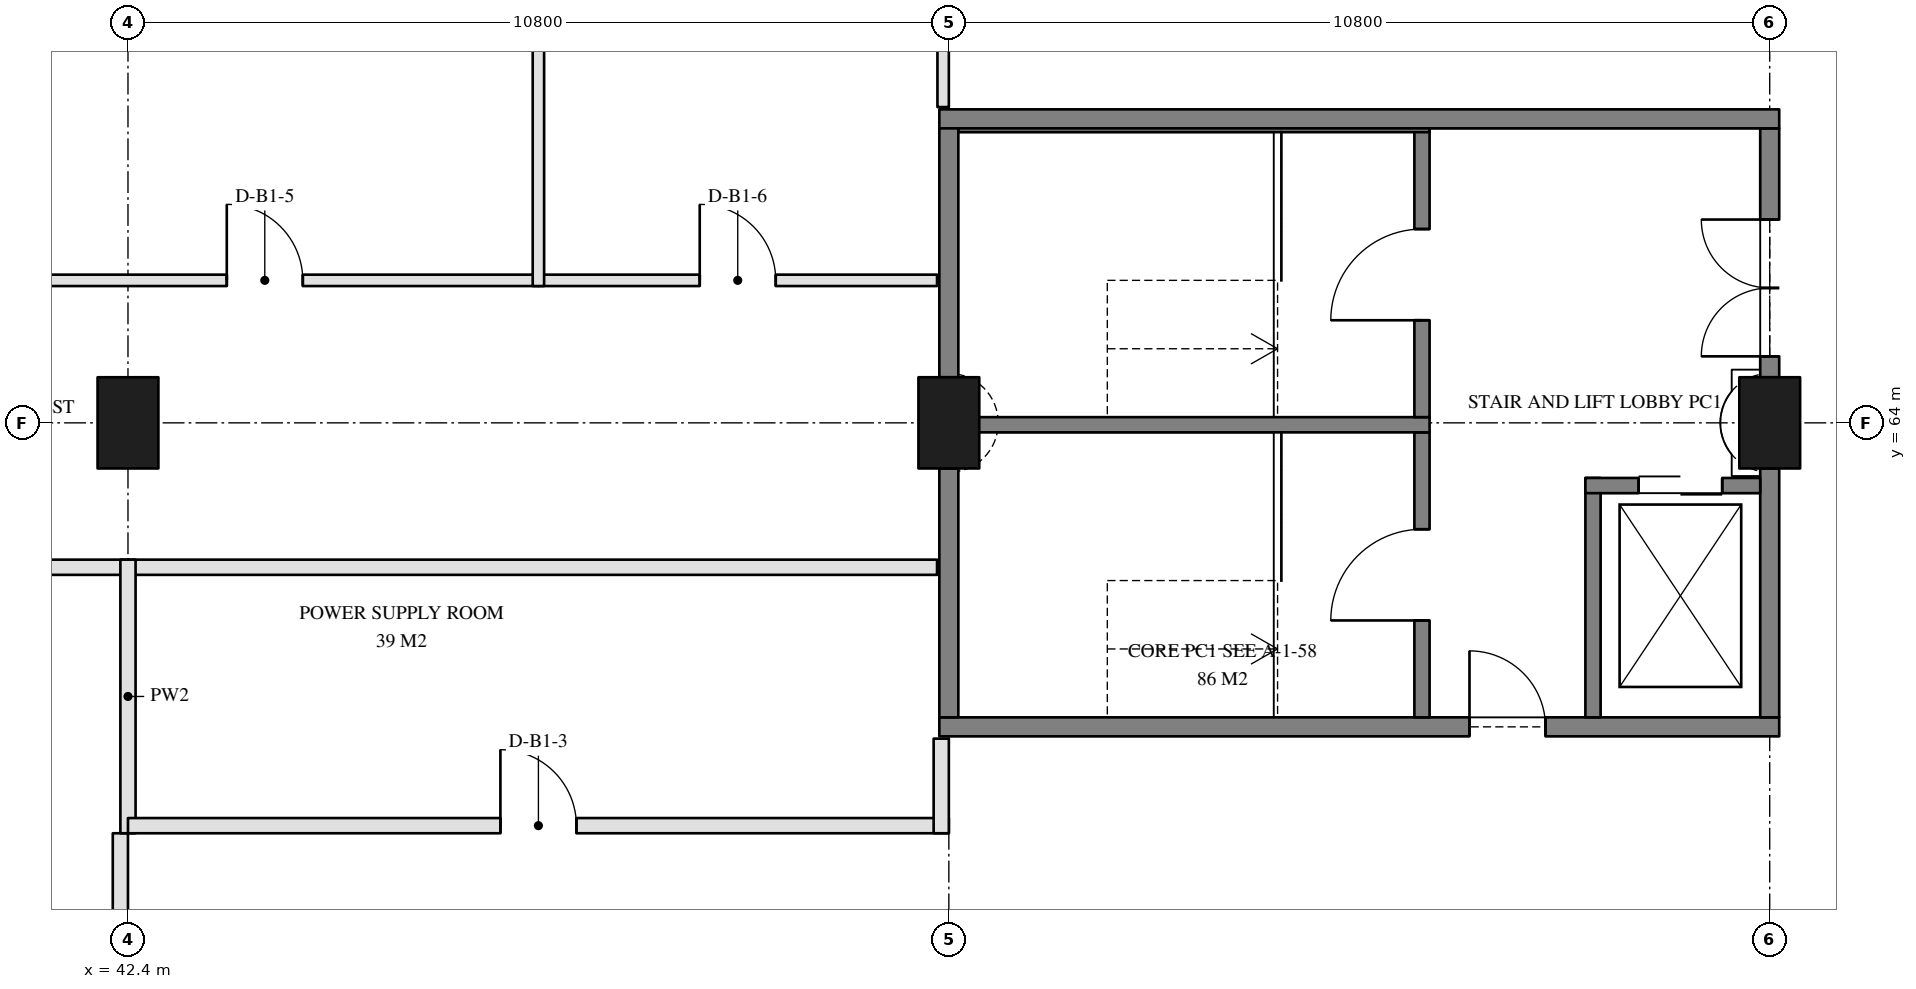
"""IFC4 building model, lengths in metres.
Left out: names, types, materials, properties, quantities, classifications, styles, units other than length and angle.
Written with IfcOpenShell. Run it as: python <this file> out.ifc"""

import sys

from ifc_helpers import new_model, si_unit, direction, frame, frame_2d, origin, origin_2d, place, context, subcontext, project, spatial, rectangle, extrude, element, fill, save


model = new_model("IFC4")
c1 = context("Model", 3, precision=1e-05, world=origin(), true_north=direction((0.0, 1.0)))
c2 = subcontext(c1, "Body", "Model", "MODEL_VIEW")
j1 = project(units=[si_unit("LENGTHUNIT", "METRE"), si_unit("PLANEANGLEUNIT", "RADIAN")], contexts=[c1])
p1 = place(None, origin())
s1 = spatial("IfcSite", under=j1, at=p1, CompositionType="ELEMENT")
p2 = place(p1, origin())
s2 = spatial("IfcBuilding", under=s1, at=p2, CompositionType="ELEMENT")
p3 = place(p2, frame((0.0, 0.0, -5.4)))
s3 = spatial("IfcBuildingStorey", under=s2, at=p3, CompositionType="ELEMENT", Elevation=-5.4)
for number, where, z_axis, x_axis in (
    (1, (42.4, 64.0, 0.0), (0.0, 0.0, 1.0), (1.0, 0.0, 0.0)),
    (2, (53.2, 64.0, 0.0), (0.0, 0.0, 1.0), (1.0, 0.0, 0.0)),
    (3, (64.0, 64.0, 0.0), (0.0, 0.0, 1.0), (1.0, 0.0, 0.0)),
):
    element("IfcColumn", number, at=place(p3, frame(where, z_axis=z_axis, x_axis=x_axis)), inside=s3, PredefinedType="COLUMN", context=c2, shape_type="SweptSolid", body=[
        extrude(rectangle(XDim=0.8, YDim=1.2, at=origin_2d()), origin(), (0.0, 0.0, 1.0), 5.4),
    ])
p4 = place(p3, frame((53.075, 60.0, 0.0), z_axis=(0.0, 0.0, 1.0), x_axis=(1.0, 0.0, 0.0)))
e4 = element("IfcWall", 4, at=p4, inside=s3, PredefinedType="SOLIDWALL", context=c2, shape_type="SweptSolid", body=[
    extrude(rectangle(XDim=11.05, YDim=0.25, at=frame_2d((5.525, 0.0))), origin(), (0.0, 0.0, 1.0), 4.8),
])
p5 = place(p4, frame((6.975, 0.0, 0.0)))
e5 = element("IfcOpeningElement", 5, at=p5, cuts=e4, PredefinedType="OPENING", context=c2, shape_type="SweptSolid", body=[
    extrude(rectangle(XDim=1.0, YDim=2.1, at=frame_2d((0.5, 1.05))), frame((0.0, 0.135, 0.0), z_axis=(0.0, -1.0, 0.0), x_axis=(1.0, 0.0, 0.0)), (0.0, 0.0, 1.0), 0.27),
])
p6 = place(p3, frame((64.0, 60.125, 0.0), z_axis=(0.0, 0.0, 1.0), x_axis=(0.0, 1.0, 0.0)))
e6 = element("IfcWall", 6, at=p6, inside=s3, PredefinedType="SOLIDWALL", context=c2, shape_type="SweptSolid", body=[
    extrude(rectangle(XDim=3.275, YDim=0.25, at=frame_2d((1.637, 0.0))), origin(), (0.0, 0.0, 1.0), 4.8),
])
p7 = place(p3, frame((64.0, 64.6, 0.0), z_axis=(0.0, 0.0, 1.0), x_axis=(0.0, 1.0, 0.0)))
e7 = element("IfcWall", 7, at=p7, inside=s3, PredefinedType="SOLIDWALL", context=c2, shape_type="SweptSolid", body=[
    extrude(rectangle(XDim=3.275, YDim=0.25, at=frame_2d((1.637, 0.0))), origin(), (0.0, 0.0, 1.0), 4.8),
])
p8 = place(p7, frame((0.275, 0.0, 0.0)))
e8 = element("IfcOpeningElement", 8, at=p8, cuts=e7, PredefinedType="OPENING", context=c2, shape_type="SweptSolid", body=[
    extrude(rectangle(XDim=1.8, YDim=2.1, at=frame_2d((0.9, 1.05))), frame((0.0, 0.135, 0.0), z_axis=(0.0, -1.0, 0.0), x_axis=(1.0, 0.0, 0.0)), (0.0, 0.0, 1.0), 0.27),
])
p9 = place(p3, frame((64.125, 68.0, 0.0), z_axis=(0.0, 0.0, 1.0), x_axis=(-1.0, 0.0, 0.0)))
e9 = element("IfcWall", 9, at=p9, inside=s3, PredefinedType="SOLIDWALL", context=c2, shape_type="SweptSolid", body=[
    extrude(rectangle(XDim=11.05, YDim=0.25, at=frame_2d((5.525, 0.0))), origin(), (0.0, 0.0, 1.0), 4.8),
])
for number, where, z_axis, x_axis in (
    (10, (53.2, 67.875, 0.0), (0.0, 0.0, 1.0), (0.0, -1.0, 0.0)),
    (11, (53.2, 63.4, 0.0), (0.0, 0.0, 1.0), (0.0, -1.0, 0.0)),
):
    element("IfcWall", number, at=place(p3, frame(where, z_axis=z_axis, x_axis=x_axis)), inside=s3, PredefinedType="SOLIDWALL", context=c2, shape_type="SweptSolid", body=[
        extrude(rectangle(XDim=3.275, YDim=0.25, at=frame_2d((1.637, 0.0))), origin(), (0.0, 0.0, 1.0), 4.8),
    ])
p10 = place(p3, frame((59.425, 60.125, 0.0), z_axis=(0.0, 0.0, 1.0), x_axis=(0.0, 1.0, 0.0)))
e12 = element("IfcWall", 12, at=p10, inside=s3, PredefinedType="SOLIDWALL", context=c2, shape_type="SweptSolid", body=[
    extrude(rectangle(XDim=3.75, YDim=0.2, at=frame_2d((1.875, 0.0))), origin(), (0.0, 0.0, 1.0), 3.6),
])
p11 = place(p10, frame((1.275, 0.0, 0.0)))
e13 = element("IfcOpeningElement", 13, at=p11, cuts=e12, PredefinedType="OPENING", context=c2, shape_type="SweptSolid", body=[
    extrude(rectangle(XDim=1.2, YDim=2.1, at=frame_2d((0.6, 1.05))), frame((0.0, 0.11, 0.0), z_axis=(0.0, -1.0, 0.0), x_axis=(1.0, 0.0, 0.0)), (0.0, 0.0, 1.0), 0.22),
])
p12 = place(p3, frame((59.525, 63.975, 0.0), z_axis=(0.0, 0.0, 1.0), x_axis=(-1.0, 0.0, 0.0)))
e14 = element("IfcWall", 14, at=p12, inside=s3, PredefinedType="SOLIDWALL", context=c2, shape_type="SweptSolid", body=[
    extrude(rectangle(XDim=6.2, YDim=0.2, at=frame_2d((3.1, 0.0))), origin(), (0.0, 0.0, 1.0), 3.6),
])
p13 = place(p3, frame((59.425, 64.075, 0.0), z_axis=(0.0, 0.0, 1.0), x_axis=(0.0, 1.0, 0.0)))
e15 = element("IfcWall", 15, at=p13, inside=s3, PredefinedType="SOLIDWALL", context=c2, shape_type="SweptSolid", body=[
    extrude(rectangle(XDim=3.8, YDim=0.2, at=frame_2d((1.9, 0.0))), origin(), (0.0, 0.0, 1.0), 3.6),
])
p14 = place(p13, frame((1.275, 0.0, 0.0)))
e16 = element("IfcOpeningElement", 16, at=p14, cuts=e15, PredefinedType="OPENING", context=c2, shape_type="SweptSolid", body=[
    extrude(rectangle(XDim=1.2, YDim=2.1, at=frame_2d((0.6, 1.05))), frame((0.0, 0.11, 0.0), z_axis=(0.0, -1.0, 0.0), x_axis=(1.0, 0.0, 0.0)), (0.0, 0.0, 1.0), 0.22),
])
p15 = place(p3, frame((61.675, 60.125, 0.0), z_axis=(0.0, 0.0, 1.0), x_axis=(0.0, 1.0, 0.0)))
e17 = element("IfcWall", 17, at=p15, inside=s3, PredefinedType="SOLIDWALL", context=c2, shape_type="SweptSolid", body=[
    extrude(rectangle(XDim=3.15, YDim=0.2, at=frame_2d((1.575, 0.0))), origin(), (0.0, 0.0, 1.0), 4.8),
])
p16 = place(p3, frame((63.875, 63.175, 0.0), z_axis=(0.0, 0.0, 1.0), x_axis=(-1.0, 0.0, 0.0)))
e18 = element("IfcWall", 18, at=p16, inside=s3, PredefinedType="SOLIDWALL", context=c2, shape_type="SweptSolid", body=[
    extrude(rectangle(XDim=2.3, YDim=0.2, at=frame_2d((1.15, 0.0))), origin(), (0.0, 0.0, 1.0), 3.6),
])
p17 = place(p16, frame((0.5, 0.0, 0.0)))
e19 = element("IfcOpeningElement", 19, at=p17, cuts=e18, PredefinedType="OPENING", context=c2, shape_type="SweptSolid", body=[
    extrude(rectangle(XDim=1.1, YDim=2.1, at=frame_2d((0.55, 1.05))), frame((0.0, 0.11, 0.0), z_axis=(0.0, -1.0, 0.0), x_axis=(1.0, 0.0, 0.0)), (0.0, 0.0, 1.0), 0.22),
])
p18 = place(p3, frame((59.525, 67.85, 0.0), z_axis=(0.0, 0.0, 1.0), x_axis=(-1.0, 0.0, 0.0)))
e20 = element("IfcWall", 20, at=p18, inside=s3, PredefinedType="SOLIDWALL", context=c2, shape_type="SweptSolid", body=[
    extrude(rectangle(XDim=6.2, YDim=0.05, at=frame_2d((3.1, 0.0))), origin(), (0.0, 0.0, 1.0), 3.6),
])
p19 = place(p3, frame((37.0, 62.1, 0.0), z_axis=(0.0, 0.0, 1.0), x_axis=(1.0, 0.0, 0.0)))
e21 = element("IfcWall", 21, at=p19, inside=s3, PredefinedType="PARTITIONING", context=c2, shape_type="SweptSolid", body=[
    extrude(rectangle(XDim=5.4, YDim=0.2, at=frame_2d((2.7, 0.0))), origin(), (0.0, 0.0, 1.0), 3.6),
])
p20 = place(p19, frame((2.2, 0.0, 0.0)))
e22 = element("IfcOpeningElement", 22, at=p20, cuts=e21, PredefinedType="OPENING", context=c2, shape_type="SweptSolid", body=[
    extrude(rectangle(XDim=1.0, YDim=2.1, at=frame_2d((0.5, 1.05))), frame((0.0, 0.11, 0.0), z_axis=(0.0, -1.0, 0.0), x_axis=(1.0, 0.0, 0.0)), (0.0, 0.0, 1.0), 0.22),
])
p21 = place(p3, frame((42.4, 62.1, 0.0), z_axis=(0.0, 0.0, 1.0), x_axis=(1.0, 0.0, 0.0)))
e23 = element("IfcWall", 23, at=p21, inside=s3, PredefinedType="PARTITIONING", context=c2, shape_type="SweptSolid", body=[
    extrude(rectangle(XDim=10.645, YDim=0.2, at=frame_2d((5.323, 0.0))), origin(), (0.0, 0.0, 1.0), 3.6),
])
p22 = place(p3, frame((40.6, 65.875, 0.0), z_axis=(0.0, 0.0, 1.0), x_axis=(1.0, 0.0, 0.0)))
e24 = element("IfcWall", 24, at=p22, inside=s3, PredefinedType="PARTITIONING", context=c2, shape_type="SweptSolid", body=[
    extrude(rectangle(XDim=7.2, YDim=0.15, at=frame_2d((3.6, 0.0))), origin(), (0.0, 0.0, 1.0), 3.6),
])
p23 = place(p22, frame((3.1, 0.0, 0.0)))
e25 = element("IfcOpeningElement", 25, at=p23, cuts=e24, PredefinedType="OPENING", context=c2, shape_type="SweptSolid", body=[
    extrude(rectangle(XDim=1.0, YDim=2.1, at=frame_2d((0.5, 1.05))), frame((0.0, 0.085, 0.0), z_axis=(0.0, -1.0, 0.0), x_axis=(1.0, 0.0, 0.0)), (0.0, 0.0, 1.0), 0.17),
])
p24 = place(p3, frame((47.8, 65.875, 0.0), z_axis=(0.0, 0.0, 1.0), x_axis=(1.0, 0.0, 0.0)))
e26 = element("IfcWall", 26, at=p24, inside=s3, PredefinedType="PARTITIONING", context=c2, shape_type="SweptSolid", body=[
    extrude(rectangle(XDim=5.245, YDim=0.15, at=frame_2d((2.623, 0.0))), origin(), (0.0, 0.0, 1.0), 3.6),
])
p25 = place(p24, frame((2.123, 0.0, 0.0)))
e27 = element("IfcOpeningElement", 27, at=p25, cuts=e26, PredefinedType="OPENING", context=c2, shape_type="SweptSolid", body=[
    extrude(rectangle(XDim=1.0, YDim=2.1, at=frame_2d((0.5, 1.05))), frame((0.0, 0.085, 0.0), z_axis=(0.0, -1.0, 0.0), x_axis=(1.0, 0.0, 0.0)), (0.0, 0.0, 1.0), 0.17),
])
p26 = place(p3, frame((42.3, 53.72, 0.0), z_axis=(0.0, 0.0, 1.0), x_axis=(0.0, 1.0, 0.0)))
e28 = element("IfcWall", 28, at=p26, inside=s3, PredefinedType="PARTITIONING", context=c2, shape_type="SweptSolid", body=[
    extrude(rectangle(XDim=4.88, YDim=0.2, at=frame_2d((2.44, 0.0))), origin(), (0.0, 0.0, 1.0), 3.6),
])
p27 = place(p3, frame((42.4, 58.6, 0.0), z_axis=(0.0, 0.0, 1.0), x_axis=(0.0, 1.0, 0.0)))
e29 = element("IfcWall", 29, at=p27, inside=s3, PredefinedType="PARTITIONING", context=c2, shape_type="SweptSolid", body=[
    extrude(rectangle(XDim=3.6, YDim=0.2, at=frame_2d((1.8, 0.0))), origin(), (0.0, 0.0, 1.0), 3.6),
])
p28 = place(p3, frame((42.4, 58.7, 0.0), z_axis=(0.0, 0.0, 1.0), x_axis=(1.0, 0.0, 0.0)))
e30 = element("IfcWall", 30, at=p28, inside=s3, PredefinedType="PARTITIONING", context=c2, shape_type="SweptSolid", body=[
    extrude(rectangle(XDim=10.8, YDim=0.2, at=frame_2d((5.4, 0.0))), origin(), (0.0, 0.0, 1.0), 3.6),
])
p29 = place(p28, frame((4.9, 0.0, 0.0)))
e31 = element("IfcOpeningElement", 31, at=p29, cuts=e30, PredefinedType="OPENING", context=c2, shape_type="SweptSolid", body=[
    extrude(rectangle(XDim=1.0, YDim=2.1, at=frame_2d((0.5, 1.05))), frame((0.0, 0.11, 0.0), z_axis=(0.0, -1.0, 0.0), x_axis=(1.0, 0.0, 0.0)), (0.0, 0.0, 1.0), 0.22),
])
p30 = place(p3, frame((53.1, 58.6, 0.0), z_axis=(0.0, 0.0, 1.0), x_axis=(0.0, 1.0, 0.0)))
e32 = element("IfcWall", 32, at=p30, inside=s3, PredefinedType="PARTITIONING", context=c2, shape_type="SweptSolid", body=[
    extrude(rectangle(XDim=1.245, YDim=0.2, at=frame_2d((0.623, 0.0))), origin(), (0.0, 0.0, 1.0), 3.6),
])
p31 = place(p3, frame((47.8, 65.8, 0.0), z_axis=(0.0, 0.0, 1.0), x_axis=(0.0, 1.0, 0.0)))
e33 = element("IfcWall", 33, at=p31, inside=s3, PredefinedType="PARTITIONING", context=c2, shape_type="SweptSolid", body=[
    extrude(rectangle(XDim=8.52, YDim=0.15, at=frame_2d((4.26, 0.0))), origin(), (0.0, 0.0, 1.0), 4.8),
])
p32 = place(p3, frame((53.125, 68.155, 0.0), z_axis=(0.0, 0.0, 1.0), x_axis=(0.0, 1.0, 0.0)))
e34 = element("IfcWall", 34, at=p32, inside=s3, PredefinedType="PARTITIONING", context=c2, shape_type="SweptSolid", body=[
    extrude(rectangle(XDim=6.125, YDim=0.15, at=frame_2d((3.062, 0.0))), origin(), (0.0, 0.0, 1.0), 3.6),
])
p33 = place(p17, frame((1.1, 0.0, 0.0), z_axis=(0.0, 0.0, 1.0), x_axis=(-1.0, 0.0, 0.0)))
e35 = element("IfcDoor", 35, at=p33, inside=s3, OperationType="DOUBLE_DOOR_SLIDING", PredefinedType="DOOR", context=c2, shape_type="SweptSolid", body=[
    extrude(rectangle(XDim=1.1, YDim=2.1, at=frame_2d((0.55, 1.05))), frame((0.0, 0.025, 0.0), z_axis=(0.0, -1.0, 0.0), x_axis=(1.0, 0.0, 0.0)), (0.0, 0.0, 1.0), 0.05),
])
fill(e19, e35)
p34 = place(p11, frame((1.2, 0.0, 0.0), z_axis=(0.0, 0.0, 1.0), x_axis=(-1.0, 0.0, 0.0)))
e36 = element("IfcDoor", 36, at=p34, inside=s3, OperationType="SINGLE_SWING_RIGHT", PredefinedType="DOOR", context=c2, shape_type="SweptSolid", body=[
    extrude(rectangle(XDim=1.2, YDim=2.1, at=frame_2d((0.6, 1.05))), frame((0.0, 0.025, 0.0), z_axis=(0.0, -1.0, 0.0), x_axis=(1.0, 0.0, 0.0)), (0.0, 0.0, 1.0), 0.05),
])
fill(e13, e36)
p35 = place(p14, frame((1.2, 0.0, 0.0), z_axis=(0.0, 0.0, 1.0), x_axis=(-1.0, 0.0, 0.0)))
e37 = element("IfcDoor", 37, at=p35, inside=s3, OperationType="SINGLE_SWING_RIGHT", PredefinedType="DOOR", context=c2, shape_type="SweptSolid", body=[
    extrude(rectangle(XDim=1.2, YDim=2.1, at=frame_2d((0.6, 1.05))), frame((0.0, 0.025, 0.0), z_axis=(0.0, -1.0, 0.0), x_axis=(1.0, 0.0, 0.0)), (0.0, 0.0, 1.0), 0.05),
])
fill(e16, e37)
p36 = place(p8, frame((1.8, 0.0, 0.0), z_axis=(0.0, 0.0, 1.0), x_axis=(-1.0, 0.0, 0.0)))
e38 = element("IfcDoor", 38, at=p36, inside=s3, OperationType="DOUBLE_DOOR_DOUBLE_SWING", PredefinedType="DOOR", context=c2, shape_type="SweptSolid", body=[
    extrude(rectangle(XDim=1.8, YDim=2.1, at=frame_2d((0.9, 1.05))), frame((0.0, 0.025, 0.0), z_axis=(0.0, -1.0, 0.0), x_axis=(1.0, 0.0, 0.0)), (0.0, 0.0, 1.0), 0.05),
])
fill(e8, e38)
p37 = place(p5, frame((1.0, 0.0, 0.0), z_axis=(0.0, 0.0, 1.0), x_axis=(-1.0, 0.0, 0.0)))
e39 = element("IfcDoor", 39, at=p37, inside=s3, OperationType="SINGLE_SWING_LEFT", PredefinedType="DOOR", context=c2, shape_type="SweptSolid", body=[
    extrude(rectangle(XDim=1.0, YDim=2.1, at=frame_2d((0.5, 1.05))), frame((0.0, 0.025, 0.0), z_axis=(0.0, -1.0, 0.0), x_axis=(1.0, 0.0, 0.0)), (0.0, 0.0, 1.0), 0.05),
])
fill(e5, e39)
p38 = place(p29, origin())
e40 = element("IfcDoor", 40, at=p38, inside=s3, OperationType="SINGLE_SWING_LEFT", PredefinedType="DOOR", context=c2, shape_type="SweptSolid", body=[
    extrude(rectangle(XDim=1.0, YDim=2.1, at=frame_2d((0.5, 1.05))), frame((0.0, 0.025, 0.0), z_axis=(0.0, -1.0, 0.0), x_axis=(1.0, 0.0, 0.0)), (0.0, 0.0, 1.0), 0.05),
])
fill(e31, e40)
p39 = place(p23, origin())
e41 = element("IfcDoor", 41, at=p39, inside=s3, OperationType="SINGLE_SWING_RIGHT", PredefinedType="DOOR", context=c2, shape_type="SweptSolid", body=[
    extrude(rectangle(XDim=1.0, YDim=2.1, at=frame_2d((0.5, 1.05))), frame((0.0, 0.025, 0.0), z_axis=(0.0, -1.0, 0.0), x_axis=(1.0, 0.0, 0.0)), (0.0, 0.0, 1.0), 0.05),
])
fill(e25, e41)
p40 = place(p25, origin())
e42 = element("IfcDoor", 42, at=p40, inside=s3, OperationType="SINGLE_SWING_LEFT", PredefinedType="DOOR", context=c2, shape_type="SweptSolid", body=[
    extrude(rectangle(XDim=1.0, YDim=2.1, at=frame_2d((0.5, 1.05))), frame((0.0, 0.025, 0.0), z_axis=(0.0, -1.0, 0.0), x_axis=(1.0, 0.0, 0.0)), (0.0, 0.0, 1.0), 0.05),
])
fill(e27, e42)
save(model, sys.argv[1])
